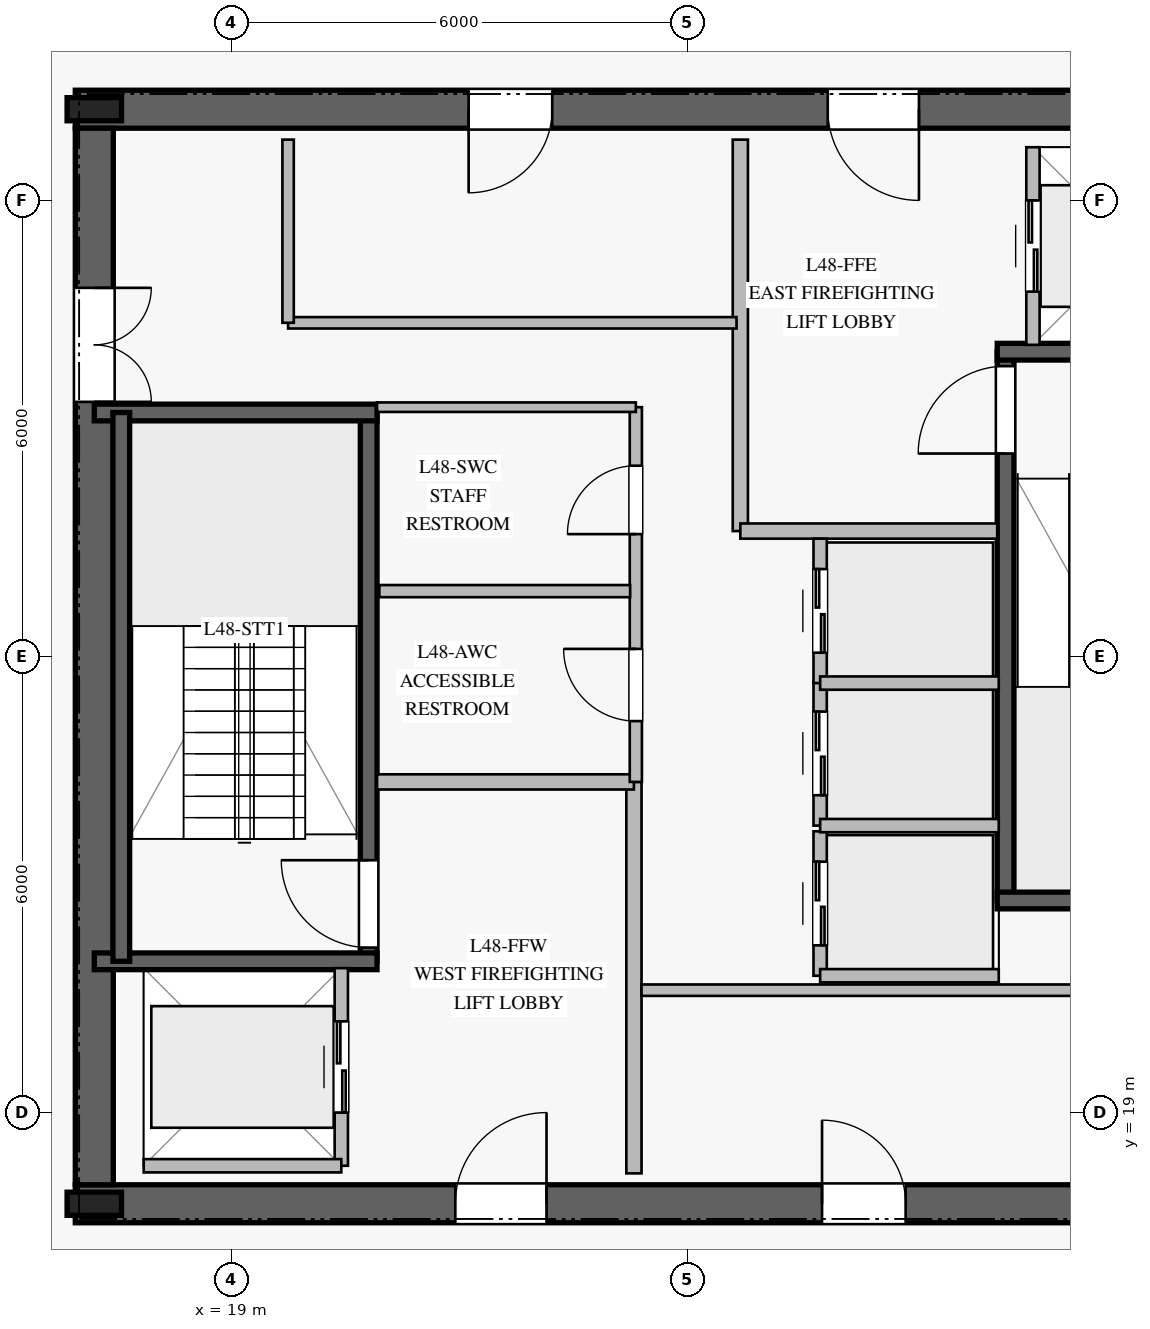
"""IFC4 building model, lengths in metres.
Left out: names, types, materials, properties, quantities, classifications, styles, units other than length and angle.
Written with IfcOpenShell. Run it as: python <this file> out.ifc"""

import sys

from ifc_helpers import new_model, si_unit, direction, frame, frame_2d, origin, origin_2d, place, context, subcontext, project, spatial, rectangle, i_section, extrude, element, fill, save


model = new_model("IFC4")
c1 = context("Model", 3, precision=1e-05, world=origin(), true_north=direction((0.0, 1.0)))
c2 = subcontext(c1, "Body", "Model", "MODEL_VIEW")
j1 = project(units=[si_unit("LENGTHUNIT", "METRE"), si_unit("PLANEANGLEUNIT", "RADIAN")], contexts=[c1])
p1 = place(None, origin())
s1 = spatial("IfcSite", under=j1, at=p1, CompositionType="ELEMENT")
p2 = place(p1, origin())
s2 = spatial("IfcBuilding", under=s1, at=p2, CompositionType="ELEMENT")
p3 = place(p2, frame((0.0, 0.0, 200.8)))
s3 = spatial("IfcBuildingStorey", under=s2, at=p3, CompositionType="ELEMENT", Elevation=200.8)
p4 = place(p3, frame((16.95, 17.8, 0.0), z_axis=(0.0, 0.0, 1.0), x_axis=(1.0, 0.0, 0.0)))
e1 = element("IfcWall", 1, at=p4, inside=s3, PredefinedType="SHEAR", context=c2, shape_type="SweptSolid", body=[
    extrude(rectangle(XDim=16.1, YDim=0.5, at=frame_2d((8.05, 0.0))), origin(), (0.0, 0.0, 1.0), 3.78),
])
p5 = place(p4, frame((5.0, 0.0, 0.0)))
e2 = element("IfcOpeningElement", 2, at=p5, cuts=e1, PredefinedType="OPENING", context=c2, shape_type="SweptSolid", body=[
    extrude(rectangle(XDim=1.2, YDim=2.25, at=frame_2d((0.6, 1.125))), frame((0.0, 0.26, 0.0), z_axis=(0.0, -1.0, 0.0), x_axis=(1.0, 0.0, 0.0)), (0.0, 0.0, 1.0), 0.52),
])
p6 = place(p4, frame((13.95, 0.0, 0.0)))
e3 = element("IfcOpeningElement", 3, at=p6, cuts=e1, PredefinedType="OPENING", context=c2, shape_type="SweptSolid", body=[
    extrude(rectangle(XDim=0.9, YDim=2.1, at=frame_2d((0.45, 1.05))), frame((0.0, 0.26, 0.0), z_axis=(0.0, -1.0, 0.0), x_axis=(1.0, 0.0, 0.0)), (0.0, 0.0, 1.0), 0.52),
])
p7 = place(p4, frame((9.825, 0.0, 0.0)))
e4 = element("IfcOpeningElement", 4, at=p7, cuts=e1, PredefinedType="OPENING", context=c2, shape_type="SweptSolid", body=[
    extrude(rectangle(XDim=1.1, YDim=2.2, at=frame_2d((0.55, 1.1))), frame((0.0, 0.26, 0.0), z_axis=(0.0, -1.0, 0.0), x_axis=(1.0, 0.0, 0.0)), (0.0, 0.0, 1.0), 0.52),
])
p8 = place(p3, frame((33.05, 32.2, 0.0), z_axis=(0.0, 0.0, 1.0), x_axis=(-1.0, 0.0, 0.0)))
e5 = element("IfcWall", 5, at=p8, inside=s3, PredefinedType="SHEAR", context=c2, shape_type="SweptSolid", body=[
    extrude(rectangle(XDim=16.1, YDim=0.5, at=frame_2d((8.05, 0.0))), origin(), (0.0, 0.0, 1.0), 3.78),
])
p9 = place(p8, frame((5.0, 0.0, 0.0)))
e6 = element("IfcOpeningElement", 6, at=p9, cuts=e5, PredefinedType="OPENING", context=c2, shape_type="SweptSolid", body=[
    extrude(rectangle(XDim=1.2, YDim=2.25, at=frame_2d((0.6, 1.125))), frame((0.0, 0.26, 0.0), z_axis=(0.0, -1.0, 0.0), x_axis=(1.0, 0.0, 0.0)), (0.0, 0.0, 1.0), 0.52),
])
p10 = place(p8, frame((9.825, 0.0, 0.0)))
e7 = element("IfcOpeningElement", 7, at=p10, cuts=e5, PredefinedType="OPENING", context=c2, shape_type="SweptSolid", body=[
    extrude(rectangle(XDim=1.1, YDim=2.2, at=frame_2d((0.55, 1.1))), frame((0.0, 0.26, 0.0), z_axis=(0.0, -1.0, 0.0), x_axis=(1.0, 0.0, 0.0)), (0.0, 0.0, 1.0), 0.52),
])
p11 = place(p3, frame((17.2, 31.95, 0.0), z_axis=(0.0, 0.0, 1.0), x_axis=(0.0, -1.0, 0.0)))
e8 = element("IfcWall", 8, at=p11, inside=s3, PredefinedType="SHEAR", context=c2, shape_type="SweptSolid", body=[
    extrude(rectangle(XDim=13.9, YDim=0.5, at=frame_2d((6.95, 0.0))), origin(), (0.0, 0.0, 1.0), 3.78),
])
p12 = place(p11, frame((2.1, 0.0, 0.0)))
e9 = element("IfcOpeningElement", 9, at=p12, cuts=e8, PredefinedType="OPENING", context=c2, shape_type="SweptSolid", body=[
    extrude(rectangle(XDim=1.5, YDim=2.2, at=frame_2d((0.75, 1.1))), frame((0.0, 0.26, 0.0), z_axis=(0.0, -1.0, 0.0), x_axis=(1.0, 0.0, 0.0)), (0.0, 0.0, 1.0), 0.52),
])
for number, where, z_axis, x_axis in (
    (10, (17.2, 17.8, 0.0), (0.0, 0.0, 1.0), (1.0, 0.0, 0.0)),
    (11, (17.2, 32.2, 0.0), (0.0, 0.0, 1.0), (1.0, 0.0, 0.0)),
):
    element("IfcColumn", number, at=place(p3, frame(where, z_axis=z_axis, x_axis=x_axis)), inside=s3, PredefinedType="COLUMN", context=c2, shape_type="SweptSolid", body=[
        extrude(i_section(OverallWidth=0.304, OverallDepth=0.716, WebThickness=0.021, FlangeThickness=0.04, at=origin_2d()), origin(), (0.0, 0.0, 1.0), 4.0),
    ])
p13 = place(p3, frame((20.81, 20.99, 0.0), z_axis=(0.0, 0.0, 1.0), x_axis=(0.0, 1.0, 0.0)))
e12 = element("IfcWall", 12, at=p13, inside=s3, PredefinedType="SOLIDWALL", context=c2, shape_type="SweptSolid", body=[
    extrude(rectangle(XDim=7.22, YDim=0.22, at=frame_2d((3.61, 0.0))), origin(), (0.0, 0.0, 1.0), 3.78),
])
p14 = place(p13, frame((0.18, 0.0, 0.0)))
e13 = element("IfcOpeningElement", 13, at=p14, cuts=e12, PredefinedType="OPENING", context=c2, shape_type="SweptSolid", body=[
    extrude(rectangle(XDim=1.15, YDim=2.2, at=frame_2d((0.575, 1.1))), frame((0.0, 0.12, 0.0), z_axis=(0.0, -1.0, 0.0), x_axis=(1.0, 0.0, 0.0)), (0.0, 0.0, 1.0), 0.24),
])
for number, where, z_axis, x_axis in (
    (14, (17.2, 20.99, 0.0), (0.0, 0.0, 1.0), (1.0, 0.0, 0.0)),
    (15, (17.2, 28.21, 0.0), (0.0, 0.0, 1.0), (1.0, 0.0, 0.0)),
):
    element("IfcWall", number, at=place(p3, frame(where, z_axis=z_axis, x_axis=x_axis)), inside=s3, PredefinedType="SOLIDWALL", context=c2, shape_type="SweptSolid", body=[
        extrude(rectangle(XDim=3.72, YDim=0.22, at=frame_2d((1.86, 0.0))), origin(), (0.0, 0.0, 1.0), 3.78),
    ])
p15 = place(p3, frame((17.555, 28.21, 0.0), z_axis=(0.0, 0.0, 1.0), x_axis=(0.0, -1.0, 0.0)))
e16 = element("IfcWall", 16, at=p15, inside=s3, PredefinedType="SOLIDWALL", context=c2, shape_type="SweptSolid", body=[
    extrude(rectangle(XDim=7.22, YDim=0.22, at=frame_2d((3.61, 0.0))), origin(), (0.0, 0.0, 1.0), 3.78),
])
p16 = place(p3, frame((29.19, 21.79, 0.0), z_axis=(0.0, 0.0, 1.0), x_axis=(0.0, 1.0, 0.0)))
e17 = element("IfcWall", 17, at=p16, inside=s3, PredefinedType="SOLIDWALL", context=c2, shape_type="SweptSolid", body=[
    extrude(rectangle(XDim=7.22, YDim=0.22, at=frame_2d((3.61, 0.0))), origin(), (0.0, 0.0, 1.0), 3.78),
])
p17 = place(p16, frame((5.88, 0.0, 0.0)))
e18 = element("IfcOpeningElement", 18, at=p17, cuts=e17, PredefinedType="OPENING", context=c2, shape_type="SweptSolid", body=[
    extrude(rectangle(XDim=1.15, YDim=2.2, at=frame_2d((0.575, 1.1))), frame((0.0, 0.12, 0.0), z_axis=(0.0, -1.0, 0.0), x_axis=(1.0, 0.0, 0.0)), (0.0, 0.0, 1.0), 0.24),
])
for number, where, z_axis, x_axis in (
    (19, (29.08, 21.79, 0.0), (0.0, 0.0, 1.0), (1.0, 0.0, 0.0)),
    (20, (29.08, 29.01, 0.0), (0.0, 0.0, 1.0), (1.0, 0.0, 0.0)),
):
    element("IfcWall", number, at=place(p3, frame(where, z_axis=z_axis, x_axis=x_axis)), inside=s3, PredefinedType="SOLIDWALL", context=c2, shape_type="SweptSolid", body=[
        extrude(rectangle(XDim=3.72, YDim=0.22, at=frame_2d((1.86, 0.0))), origin(), (0.0, 0.0, 1.0), 3.78),
    ])
p18 = place(p3, frame((24.3, 18.2, 0.0), z_axis=(0.0, 0.0, 1.0), x_axis=(0.0, 1.0, 0.0)))
e21 = element("IfcWall", 21, at=p18, inside=s3, PredefinedType="PARTITIONING", context=c2, shape_type="SweptSolid", body=[
    extrude(rectangle(XDim=5.15, YDim=0.2, at=frame_2d((2.575, 0.0))), origin(), (0.0, 0.0, 1.0), 3.78),
])
p19 = place(p3, frame((20.92, 23.35, 0.0), z_axis=(0.0, 0.0, 1.0), x_axis=(1.0, 0.0, 0.0)))
e22 = element("IfcWall", 22, at=p19, inside=s3, PredefinedType="PARTITIONING", context=c2, shape_type="SweptSolid", body=[
    extrude(rectangle(XDim=3.38, YDim=0.2, at=frame_2d((1.69, 0.0))), origin(), (0.0, 0.0, 1.0), 3.78),
])
p20 = place(p3, frame((25.7, 26.65, 0.0), z_axis=(0.0, 0.0, 1.0), x_axis=(0.0, 1.0, 0.0)))
e23 = element("IfcWall", 23, at=p20, inside=s3, PredefinedType="PARTITIONING", context=c2, shape_type="SweptSolid", body=[
    extrude(rectangle(XDim=5.15, YDim=0.2, at=frame_2d((2.575, 0.0))), origin(), (0.0, 0.0, 1.0), 3.78),
])
p21 = place(p3, frame((25.7, 26.65, 0.0), z_axis=(0.0, 0.0, 1.0), x_axis=(1.0, 0.0, 0.0)))
e24 = element("IfcWall", 24, at=p21, inside=s3, PredefinedType="PARTITIONING", context=c2, shape_type="SweptSolid", body=[
    extrude(rectangle(XDim=3.38, YDim=0.2, at=frame_2d((1.69, 0.0))), origin(), (0.0, 0.0, 1.0), 3.78),
])
p22 = place(p3, frame((24.325, 23.35, 0.0), z_axis=(0.0, 0.0, 1.0), x_axis=(0.0, 1.0, 0.0)))
e25 = element("IfcWall", 25, at=p22, inside=s3, PredefinedType="PLUMBINGWALL", context=c2, shape_type="SweptSolid", body=[
    extrude(rectangle(XDim=4.93, YDim=0.16, at=frame_2d((2.465, 0.0))), origin(), (0.0, 0.0, 1.0), 3.78),
])
p23 = place(p22, frame((0.8, 0.0, 0.0)))
e26 = element("IfcOpeningElement", 26, at=p23, cuts=e25, PredefinedType="OPENING", context=c2, shape_type="SweptSolid", body=[
    extrude(rectangle(XDim=0.95, YDim=2.1, at=frame_2d((0.475, 1.05))), frame((0.0, 0.09, 0.0), z_axis=(0.0, -1.0, 0.0), x_axis=(1.0, 0.0, 0.0)), (0.0, 0.0, 1.0), 0.18),
])
p24 = place(p22, frame((3.26, 0.0, 0.0)))
e27 = element("IfcOpeningElement", 27, at=p24, cuts=e25, PredefinedType="OPENING", context=c2, shape_type="SweptSolid", body=[
    extrude(rectangle(XDim=0.9, YDim=2.1, at=frame_2d((0.45, 1.05))), frame((0.0, 0.09, 0.0), z_axis=(0.0, -1.0, 0.0), x_axis=(1.0, 0.0, 0.0)), (0.0, 0.0, 1.0), 0.18),
])
p25 = place(p3, frame((20.92, 28.28, 0.0), z_axis=(0.0, 0.0, 1.0), x_axis=(1.0, 0.0, 0.0)))
e28 = element("IfcWall", 28, at=p25, inside=s3, PredefinedType="PARTITIONING", context=c2, shape_type="SweptSolid", body=[
    extrude(rectangle(XDim=3.405, YDim=0.125, at=frame_2d((1.703, 0.0))), origin(), (0.0, 0.0, 1.0), 3.78),
])
p26 = place(p3, frame((20.95, 25.86, 0.0), z_axis=(0.0, 0.0, 1.0), x_axis=(1.0, 0.0, 0.0)))
e29 = element("IfcWall", 29, at=p26, inside=s3, PredefinedType="PLUMBINGWALL", context=c2, shape_type="SweptSolid", body=[
    extrude(rectangle(XDim=3.3, YDim=0.16, at=frame_2d((1.65, 0.0))), origin(), (0.0, 0.0, 1.0), 3.78),
])
p27 = place(p3, frame((24.4, 20.61, 0.0), z_axis=(0.0, 0.0, 1.0), x_axis=(1.0, 0.0, 0.0)))
e30 = element("IfcWall", 30, at=p27, inside=s3, PredefinedType="PARTITIONING", context=c2, shape_type="SweptSolid", body=[
    extrude(rectangle(XDim=5.9, YDim=0.15, at=frame_2d((2.95, 0.0))), origin(), (0.0, 0.0, 1.0), 3.78),
])
p28 = place(p3, frame((19.75, 29.39, 0.0), z_axis=(0.0, 0.0, 1.0), x_axis=(1.0, 0.0, 0.0)))
e31 = element("IfcWall", 31, at=p28, inside=s3, PredefinedType="PARTITIONING", context=c2, shape_type="SweptSolid", body=[
    extrude(rectangle(XDim=5.9, YDim=0.15, at=frame_2d((2.95, 0.0))), origin(), (0.0, 0.0, 1.0), 3.78),
])
p29 = place(p3, frame((19.75, 29.39, 0.0), z_axis=(0.0, 0.0, 1.0), x_axis=(0.0, 1.0, 0.0)))
e32 = element("IfcWall", 32, at=p29, inside=s3, PredefinedType="PARTITIONING", context=c2, shape_type="SweptSolid", body=[
    extrude(rectangle(XDim=2.41, YDim=0.15, at=frame_2d((1.205, 0.0))), origin(), (0.0, 0.0, 1.0), 3.78),
])
p30 = place(p3, frame((26.75, 20.8, 0.0), z_axis=(0.0, 0.0, 1.0), x_axis=(0.0, 1.0, 0.0)))
e33 = element("IfcWall", 33, at=p30, inside=s3, PredefinedType="PARTITIONING", context=c2, shape_type="SweptSolid", body=[
    extrude(rectangle(XDim=1.9, YDim=0.175, at=frame_2d((0.95, 0.0))), origin(), (0.0, 0.0, 1.0), 3.78),
])
p31 = place(p30, frame((0.4, 0.0, 0.0)))
e34 = element("IfcOpeningElement", 34, at=p31, cuts=e33, PredefinedType="OPENING", context=c2, shape_type="SweptSolid", body=[
    extrude(rectangle(XDim=1.1, YDim=2.2, at=frame_2d((0.55, 1.1))), frame((0.0, 0.098, 0.0), z_axis=(0.0, -1.0, 0.0), x_axis=(1.0, 0.0, 0.0)), (0.0, 0.0, 1.0), 0.195),
])
p32 = place(p3, frame((26.75, 20.8, 0.0), z_axis=(0.0, 0.0, 1.0), x_axis=(1.0, 0.0, 0.0)))
e35 = element("IfcWall", 35, at=p32, inside=s3, PredefinedType="PARTITIONING", context=c2, shape_type="SweptSolid", body=[
    extrude(rectangle(XDim=2.35, YDim=0.175, at=frame_2d((1.175, 0.0))), origin(), (0.0, 0.0, 1.0), 3.78),
])
p33 = place(p3, frame((26.75, 22.775, 0.0), z_axis=(0.0, 0.0, 1.0), x_axis=(0.0, 1.0, 0.0)))
e36 = element("IfcWall", 36, at=p33, inside=s3, PredefinedType="PARTITIONING", context=c2, shape_type="SweptSolid", body=[
    extrude(rectangle(XDim=1.9, YDim=0.175, at=frame_2d((0.95, 0.0))), origin(), (0.0, 0.0, 1.0), 3.78),
])
p34 = place(p33, frame((0.4, 0.0, 0.0)))
e37 = element("IfcOpeningElement", 37, at=p34, cuts=e36, PredefinedType="OPENING", context=c2, shape_type="SweptSolid", body=[
    extrude(rectangle(XDim=1.1, YDim=2.2, at=frame_2d((0.55, 1.1))), frame((0.0, 0.098, 0.0), z_axis=(0.0, -1.0, 0.0), x_axis=(1.0, 0.0, 0.0)), (0.0, 0.0, 1.0), 0.195),
])
p35 = place(p3, frame((26.75, 22.775, 0.0), z_axis=(0.0, 0.0, 1.0), x_axis=(1.0, 0.0, 0.0)))
e38 = element("IfcWall", 38, at=p35, inside=s3, PredefinedType="PARTITIONING", context=c2, shape_type="SweptSolid", body=[
    extrude(rectangle(XDim=2.35, YDim=0.175, at=frame_2d((1.175, 0.0))), origin(), (0.0, 0.0, 1.0), 3.78),
])
p36 = place(p3, frame((26.75, 24.65, 0.0), z_axis=(0.0, 0.0, 1.0), x_axis=(0.0, 1.0, 0.0)))
e39 = element("IfcWall", 39, at=p36, inside=s3, PredefinedType="PARTITIONING", context=c2, shape_type="SweptSolid", body=[
    extrude(rectangle(XDim=1.9, YDim=0.175, at=frame_2d((0.95, 0.0))), origin(), (0.0, 0.0, 1.0), 3.78),
])
p37 = place(p36, frame((0.4, 0.0, 0.0)))
e40 = element("IfcOpeningElement", 40, at=p37, cuts=e39, PredefinedType="OPENING", context=c2, shape_type="SweptSolid", body=[
    extrude(rectangle(XDim=1.1, YDim=2.2, at=frame_2d((0.55, 1.1))), frame((0.0, 0.098, 0.0), z_axis=(0.0, -1.0, 0.0), x_axis=(1.0, 0.0, 0.0)), (0.0, 0.0, 1.0), 0.195),
])
p38 = place(p3, frame((26.75, 24.65, 0.0), z_axis=(0.0, 0.0, 1.0), x_axis=(1.0, 0.0, 0.0)))
e41 = element("IfcWall", 41, at=p38, inside=s3, PredefinedType="PARTITIONING", context=c2, shape_type="SweptSolid", body=[
    extrude(rectangle(XDim=2.35, YDim=0.175, at=frame_2d((1.175, 0.0))), origin(), (0.0, 0.0, 1.0), 3.78),
])
p39 = place(p3, frame((20.45, 18.3, 0.0), z_axis=(0.0, 0.0, 1.0), x_axis=(0.0, 1.0, 0.0)))
e42 = element("IfcWall", 42, at=p39, inside=s3, PredefinedType="PARTITIONING", context=c2, shape_type="SweptSolid", body=[
    extrude(rectangle(XDim=2.6, YDim=0.175, at=frame_2d((1.3, 0.0))), origin(), (0.0, 0.0, 1.0), 3.78),
])
p40 = place(p39, frame((0.7, 0.0, 0.0)))
e43 = element("IfcOpeningElement", 43, at=p40, cuts=e42, PredefinedType="OPENING", context=c2, shape_type="SweptSolid", body=[
    extrude(rectangle(XDim=1.2, YDim=2.2, at=frame_2d((0.6, 1.1))), frame((0.0, 0.098, 0.0), z_axis=(0.0, -1.0, 0.0), x_axis=(1.0, 0.0, 0.0)), (0.0, 0.0, 1.0), 0.195),
])
p41 = place(p3, frame((17.85, 18.3, 0.0), z_axis=(0.0, 0.0, 1.0), x_axis=(1.0, 0.0, 0.0)))
e44 = element("IfcWall", 44, at=p41, inside=s3, PredefinedType="PARTITIONING", context=c2, shape_type="SweptSolid", body=[
    extrude(rectangle(XDim=2.6, YDim=0.175, at=frame_2d((1.3, 0.0))), origin(), (0.0, 0.0, 1.0), 3.78),
])
p42 = place(p3, frame((29.55, 29.1, 0.0), z_axis=(0.0, 0.0, 1.0), x_axis=(0.0, 1.0, 0.0)))
e45 = element("IfcWall", 45, at=p42, inside=s3, PredefinedType="PARTITIONING", context=c2, shape_type="SweptSolid", body=[
    extrude(rectangle(XDim=2.6, YDim=0.175, at=frame_2d((1.3, 0.0))), origin(), (0.0, 0.0, 1.0), 3.78),
])
p43 = place(p42, frame((0.7, 0.0, 0.0)))
e46 = element("IfcOpeningElement", 46, at=p43, cuts=e45, PredefinedType="OPENING", context=c2, shape_type="SweptSolid", body=[
    extrude(rectangle(XDim=1.2, YDim=2.2, at=frame_2d((0.6, 1.1))), frame((0.0, 0.098, 0.0), z_axis=(0.0, -1.0, 0.0), x_axis=(1.0, 0.0, 0.0)), (0.0, 0.0, 1.0), 0.195),
])
p44 = place(p14, origin())
e47 = element("IfcDoor", 47, at=p44, inside=s3, OperationType="SINGLE_SWING_RIGHT", PredefinedType="DOOR", context=c2, shape_type="SweptSolid", body=[
    extrude(rectangle(XDim=1.15, YDim=2.2, at=frame_2d((0.575, 1.1))), frame((0.0, 0.025, 0.0), z_axis=(0.0, -1.0, 0.0), x_axis=(1.0, 0.0, 0.0)), (0.0, 0.0, 1.0), 0.05),
])
fill(e13, e47)
p45 = place(p17, origin())
e48 = element("IfcDoor", 48, at=p45, inside=s3, OperationType="SINGLE_SWING_LEFT", PredefinedType="DOOR", context=c2, shape_type="SweptSolid", body=[
    extrude(rectangle(XDim=1.15, YDim=2.2, at=frame_2d((0.575, 1.1))), frame((0.0, 0.025, 0.0), z_axis=(0.0, -1.0, 0.0), x_axis=(1.0, 0.0, 0.0)), (0.0, 0.0, 1.0), 0.05),
])
fill(e18, e48)
p46 = place(p5, origin())
e49 = element("IfcDoor", 49, at=p46, inside=s3, OperationType="SINGLE_SWING_RIGHT", PredefinedType="DOOR", context=c2, shape_type="SweptSolid", body=[
    extrude(rectangle(XDim=1.2, YDim=2.25, at=frame_2d((0.6, 1.125))), frame((0.0, 0.025, 0.0), z_axis=(0.0, -1.0, 0.0), x_axis=(1.0, 0.0, 0.0)), (0.0, 0.0, 1.0), 0.05),
])
fill(e2, e49)
p47 = place(p9, origin())
e50 = element("IfcDoor", 50, at=p47, inside=s3, OperationType="SINGLE_SWING_LEFT", PredefinedType="DOOR", context=c2, shape_type="SweptSolid", body=[
    extrude(rectangle(XDim=1.2, YDim=2.25, at=frame_2d((0.6, 1.125))), frame((0.0, 0.025, 0.0), z_axis=(0.0, -1.0, 0.0), x_axis=(1.0, 0.0, 0.0)), (0.0, 0.0, 1.0), 0.05),
])
fill(e6, e50)
p48 = place(p12, origin())
e51 = element("IfcDoor", 51, at=p48, inside=s3, OperationType="DOUBLE_DOOR_SINGLE_SWING", PredefinedType="DOOR", context=c2, shape_type="SweptSolid", body=[
    extrude(rectangle(XDim=1.5, YDim=2.2, at=frame_2d((0.75, 1.1))), frame((0.0, 0.025, 0.0), z_axis=(0.0, -1.0, 0.0), x_axis=(1.0, 0.0, 0.0)), (0.0, 0.0, 1.0), 0.05),
])
fill(e9, e51)
p49 = place(p23, origin())
e52 = element("IfcDoor", 52, at=p49, inside=s3, OperationType="SINGLE_SWING_RIGHT", PredefinedType="DOOR", context=c2, shape_type="SweptSolid", body=[
    extrude(rectangle(XDim=0.95, YDim=2.1, at=frame_2d((0.475, 1.05))), frame((0.0, 0.025, 0.0), z_axis=(0.0, -1.0, 0.0), x_axis=(1.0, 0.0, 0.0)), (0.0, 0.0, 1.0), 0.05),
])
fill(e26, e52)
p50 = place(p24, origin())
e53 = element("IfcDoor", 53, at=p50, inside=s3, OperationType="SINGLE_SWING_LEFT", PredefinedType="DOOR", context=c2, shape_type="SweptSolid", body=[
    extrude(rectangle(XDim=0.9, YDim=2.1, at=frame_2d((0.45, 1.05))), frame((0.0, 0.025, 0.0), z_axis=(0.0, -1.0, 0.0), x_axis=(1.0, 0.0, 0.0)), (0.0, 0.0, 1.0), 0.05),
])
fill(e27, e53)
p51 = place(p7, origin())
e54 = element("IfcDoor", 54, at=p51, inside=s3, OperationType="SINGLE_SWING_LEFT", PredefinedType="DOOR", context=c2, shape_type="SweptSolid", body=[
    extrude(rectangle(XDim=1.1, YDim=2.2, at=frame_2d((0.55, 1.1))), frame((0.0, 0.025, 0.0), z_axis=(0.0, -1.0, 0.0), x_axis=(1.0, 0.0, 0.0)), (0.0, 0.0, 1.0), 0.05),
])
fill(e4, e54)
p52 = place(p10, origin())
e55 = element("IfcDoor", 55, at=p52, inside=s3, OperationType="SINGLE_SWING_RIGHT", PredefinedType="DOOR", context=c2, shape_type="SweptSolid", body=[
    extrude(rectangle(XDim=1.1, YDim=2.2, at=frame_2d((0.55, 1.1))), frame((0.0, 0.025, 0.0), z_axis=(0.0, -1.0, 0.0), x_axis=(1.0, 0.0, 0.0)), (0.0, 0.0, 1.0), 0.05),
])
fill(e7, e55)
p53 = place(p31, origin())
e56 = element("IfcDoor", 56, at=p53, inside=s3, OperationType="DOUBLE_DOOR_SLIDING", PredefinedType="DOOR", context=c2, shape_type="SweptSolid", body=[
    extrude(rectangle(XDim=1.1, YDim=2.2, at=frame_2d((0.55, 1.1))), frame((0.0, 0.025, 0.0), z_axis=(0.0, -1.0, 0.0), x_axis=(1.0, 0.0, 0.0)), (0.0, 0.0, 1.0), 0.05),
])
fill(e34, e56)
p54 = place(p34, origin())
e57 = element("IfcDoor", 57, at=p54, inside=s3, OperationType="DOUBLE_DOOR_SLIDING", PredefinedType="DOOR", context=c2, shape_type="SweptSolid", body=[
    extrude(rectangle(XDim=1.1, YDim=2.2, at=frame_2d((0.55, 1.1))), frame((0.0, 0.025, 0.0), z_axis=(0.0, -1.0, 0.0), x_axis=(1.0, 0.0, 0.0)), (0.0, 0.0, 1.0), 0.05),
])
fill(e37, e57)
p55 = place(p37, origin())
e58 = element("IfcDoor", 58, at=p55, inside=s3, OperationType="DOUBLE_DOOR_SLIDING", PredefinedType="DOOR", context=c2, shape_type="SweptSolid", body=[
    extrude(rectangle(XDim=1.1, YDim=2.2, at=frame_2d((0.55, 1.1))), frame((0.0, 0.025, 0.0), z_axis=(0.0, -1.0, 0.0), x_axis=(1.0, 0.0, 0.0)), (0.0, 0.0, 1.0), 0.05),
])
fill(e40, e58)
p56 = place(p40, origin())
e59 = element("IfcDoor", 59, at=p56, inside=s3, OperationType="DOUBLE_DOOR_SLIDING", PredefinedType="DOOR", context=c2, shape_type="SweptSolid", body=[
    extrude(rectangle(XDim=1.2, YDim=2.2, at=frame_2d((0.6, 1.1))), frame((0.0, 0.025, 0.0), z_axis=(0.0, -1.0, 0.0), x_axis=(1.0, 0.0, 0.0)), (0.0, 0.0, 1.0), 0.05),
])
fill(e43, e59)
p57 = place(p43, origin())
e60 = element("IfcDoor", 60, at=p57, inside=s3, OperationType="DOUBLE_DOOR_SLIDING", PredefinedType="DOOR", context=c2, shape_type="SweptSolid", body=[
    extrude(rectangle(XDim=1.2, YDim=2.2, at=frame_2d((0.6, 1.1))), frame((0.0, 0.025, 0.0), z_axis=(0.0, -1.0, 0.0), x_axis=(1.0, 0.0, 0.0)), (0.0, 0.0, 1.0), 0.05),
])
fill(e46, e60)
save(model, sys.argv[1])
